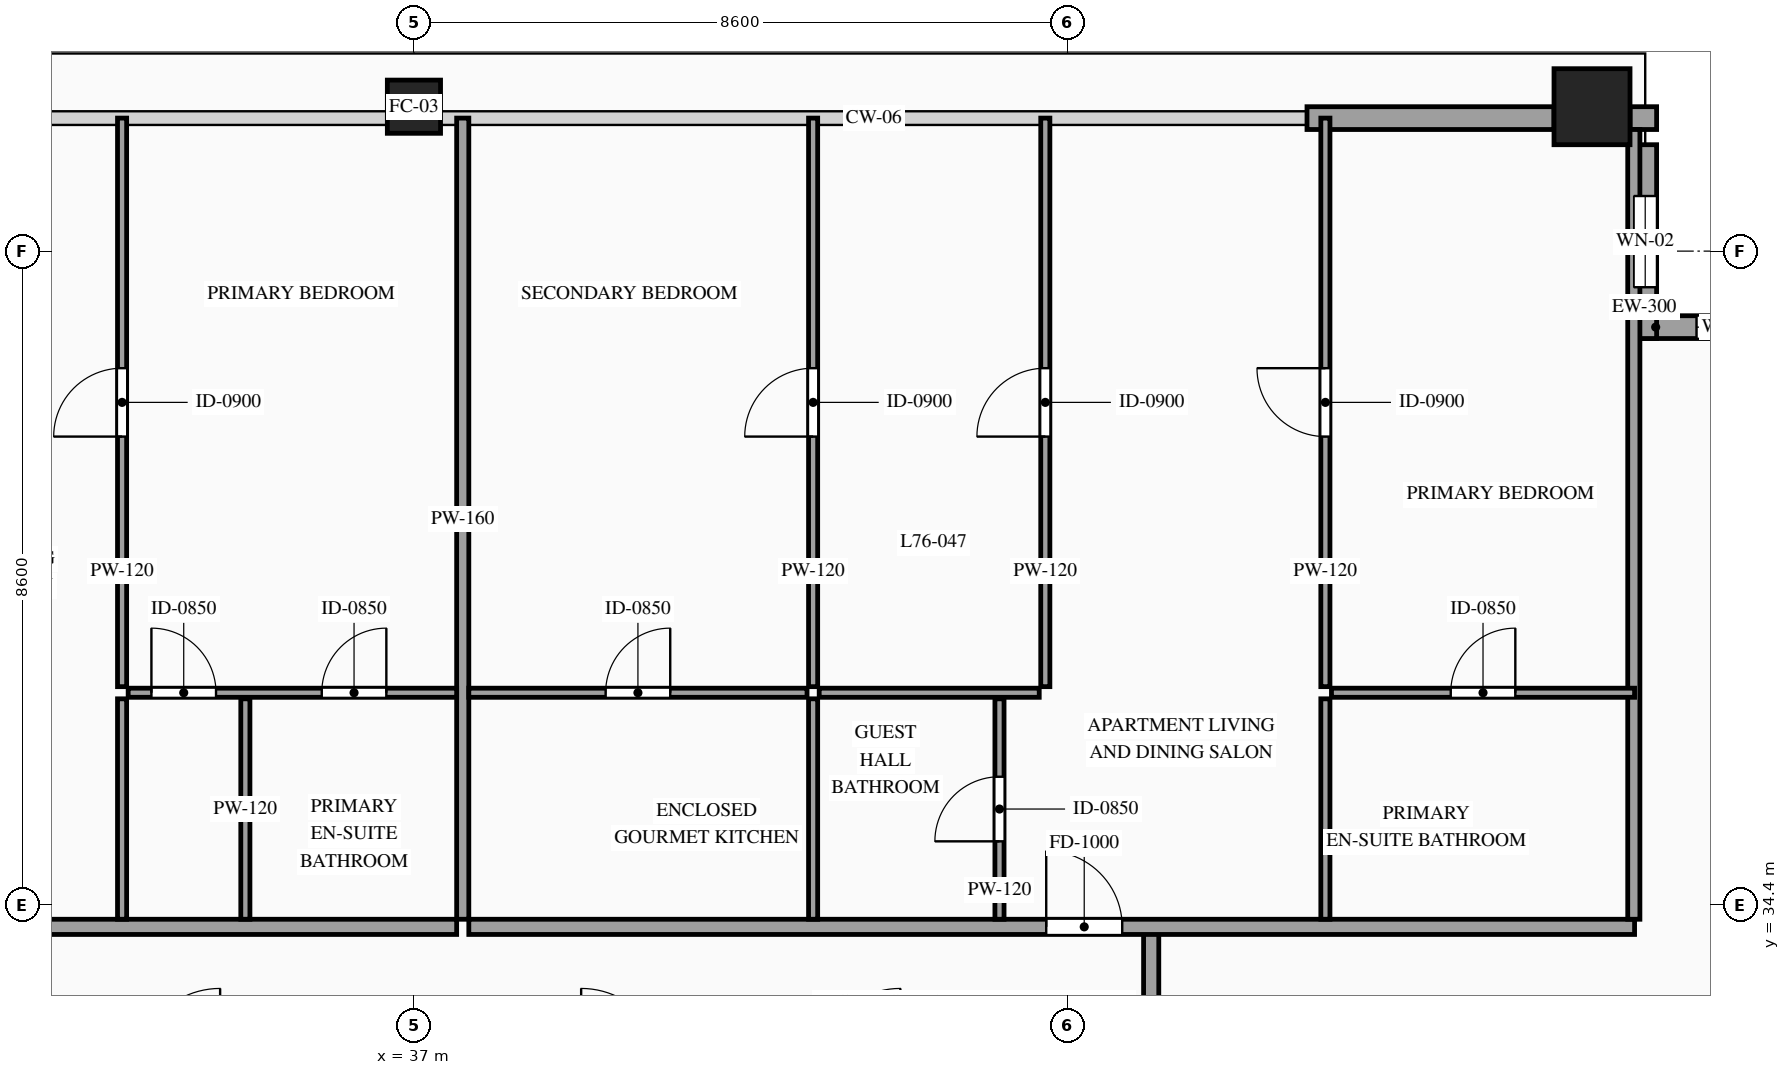
"""IFC4 building model, lengths in metres.
Left out: names, types, materials, properties, quantities, classifications, styles, units other than length and angle.
Written with IfcOpenShell. Run it as: python <this file> out.ifc"""

import sys

from ifc_helpers import new_model, si_unit, direction, frame, frame_2d, origin, origin_2d, place, context, subcontext, project, spatial, rectangle, hollow_rectangle, extrude, source, transform, mapped, element, fill, save


model = new_model("IFC4")
c1 = context("Model", 3, precision=1e-05, world=origin(), true_north=direction((0.0, 1.0)))
c2 = subcontext(c1, "Body", "Model", "MODEL_VIEW")
j1 = project(units=[si_unit("LENGTHUNIT", "METRE"), si_unit("PLANEANGLEUNIT", "RADIAN")], contexts=[c1])
p1 = place(None, origin())
s1 = spatial("IfcSite", under=j1, at=p1, CompositionType="ELEMENT")
p2 = place(p1, origin())
s2 = spatial("IfcBuilding", under=s1, at=p2, CompositionType="ELEMENT")
p3 = place(p2, frame((0.0, 0.0, 285.6)))
s3 = spatial("IfcBuildingStorey", under=s2, at=p3, CompositionType="ELEMENT", Elevation=285.6)
m1 = source(origin(), c2, "Body", "SweptSolid", [
    extrude(hollow_rectangle(XDim=0.7, YDim=0.7, WallThickness=0.032, at=origin_2d()), origin(), (0.0, 0.0, 1.0), 3.5),
])
p4 = place(p3, frame((37.0, 44.9, 0.0), z_axis=(0.0, 0.0, 1.0), x_axis=(1.0, 0.0, 0.0)))
e1 = element("IfcColumn", 1, at=p4, inside=s3, PredefinedType="COLUMN", context=c2, shape_type="MappedRepresentation", body=[
    mapped(m1, transform((0.0, 0.0, 0.0), scale=1.0)),
])
m2 = source(origin(), c2, "Body", "SweptSolid", [
    extrude(hollow_rectangle(XDim=1.0, YDim=1.0, WallThickness=0.048, at=origin_2d()), origin(), (0.0, 0.0, 1.0), 3.5),
])
p5 = place(p3, frame((52.5, 44.9, 0.0), z_axis=(0.0, 0.0, 1.0), x_axis=(1.0, 0.0, 0.0)))
e2 = element("IfcColumn", 2, at=p5, inside=s3, PredefinedType="COLUMN", context=c2, shape_type="MappedRepresentation", body=[
    mapped(m2, transform((0.0, 0.0, 0.0), scale=1.0)),
])
p6 = place(p3, frame((55.6, 42.0, 0.0), z_axis=(0.0, 0.0, 1.0), x_axis=(-1.0, 0.0, 0.0)))
e3 = element("IfcWall", 3, at=p6, inside=s3, PredefinedType="SOLIDWALL", context=c2, shape_type="SweptSolid", body=[
    extrude(rectangle(XDim=2.55, YDim=0.3, at=frame_2d((1.275, 0.0))), origin(), (0.0, 0.0, 1.0), 3.28),
])
p7 = place(p6, frame((0.825, 0.0, 0.85)))
e4 = element("IfcOpeningElement", 4, at=p7, cuts=e3, PredefinedType="OPENING", context=c2, shape_type="SweptSolid", body=[
    extrude(rectangle(XDim=0.9, YDim=1.5, at=frame_2d((0.45, 0.75))), frame((0.0, 0.165, 0.0), z_axis=(0.0, -1.0, 0.0), x_axis=(1.0, 0.0, 0.0)), (0.0, 0.0, 1.0), 0.33),
])
p8 = place(p3, frame((53.2, 41.85, 0.0), z_axis=(0.0, 0.0, 1.0), x_axis=(0.0, 1.0, 0.0)))
e5 = element("IfcWall", 5, at=p8, inside=s3, PredefinedType="SOLIDWALL", context=c2, shape_type="SweptSolid", body=[
    extrude(rectangle(XDim=2.55, YDim=0.3, at=frame_2d((1.275, 0.0))), origin(), (0.0, 0.0, 1.0), 3.28),
])
p9 = place(p8, frame((0.675, 0.0, 0.85)))
e6 = element("IfcOpeningElement", 6, at=p9, cuts=e5, PredefinedType="OPENING", context=c2, shape_type="SweptSolid", body=[
    extrude(rectangle(XDim=1.2, YDim=2.1, at=frame_2d((0.6, 1.05))), frame((0.0, 0.165, 0.0), z_axis=(0.0, -1.0, 0.0), x_axis=(1.0, 0.0, 0.0)), (0.0, 0.0, 1.0), 0.33),
])
m3 = source(origin(), c2, "Body", "SweptSolid", [
    extrude(rectangle(XDim=0.35, YDim=0.3, at=frame_2d((0.175, 0.0))), origin(), (0.0, 0.0, 1.0), 3.28),
])
p10 = place(p3, frame((53.0, 44.75, 0.0), z_axis=(0.0, 0.0, 1.0), x_axis=(1.0, 0.0, 0.0)))
e7 = element("IfcWall", 7, at=p10, inside=s3, PredefinedType="SOLIDWALL", context=c2, shape_type="MappedRepresentation", body=[
    mapped(m3, transform((0.0, 0.0, 0.0), scale=1.0)),
])
m4 = source(origin(), c2, "Body", "SweptSolid", [
    extrude(rectangle(XDim=3.25, YDim=0.3, at=frame_2d((1.625, 0.0))), origin(), (0.0, 0.0, 1.0), 2.885),
])
p11 = place(p3, frame((48.75, 44.75, 0.0), z_axis=(0.0, 0.0, 1.0), x_axis=(1.0, 0.0, 0.0)))
e8 = element("IfcWall", 8, at=p11, inside=s3, PredefinedType="SOLIDWALL", context=c2, shape_type="MappedRepresentation", body=[
    mapped(m4, transform((0.0, 0.0, 0.0), scale=1.0)),
])
m5 = source(origin(), c2, "Body", "SweptSolid", [
    extrude(rectangle(XDim=1.7, YDim=0.2, at=frame_2d((0.85, 0.0))), origin(), (0.0, 0.0, 1.0), 3.28),
])
p12 = place(p3, frame((46.7, 32.35, 0.0), z_axis=(0.0, 0.0, 1.0), x_axis=(0.0, 1.0, 0.0)))
e9 = element("IfcWall", 9, at=p12, inside=s3, PredefinedType="PARTITIONING", context=c2, shape_type="MappedRepresentation", body=[
    mapped(m5, transform((0.0, 0.0, 0.0), scale=1.0)),
])
p13 = place(p3, frame((20.94, 34.11, 0.0), z_axis=(0.0, 0.0, 1.0), x_axis=(1.0, 0.0, 0.0)))
e10 = element("IfcWall", 10, at=p13, inside=s3, PredefinedType="PARTITIONING", context=c2, shape_type="SweptSolid", body=[
    extrude(rectangle(XDim=16.622, YDim=0.2, at=frame_2d((8.311, 0.0))), origin(), (0.0, 0.0, 1.0), 3.28),
])
p14 = place(p13, frame((9.611, 0.0, 0.0)))
e11 = element("IfcOpeningElement", 11, at=p14, cuts=e10, PredefinedType="OPENING", context=c2, shape_type="SweptSolid", body=[
    extrude(rectangle(XDim=1.0, YDim=2.2, at=frame_2d((0.5, 1.1))), frame((0.0, 0.115, 0.0), z_axis=(0.0, -1.0, 0.0), x_axis=(1.0, 0.0, 0.0)), (0.0, 0.0, 1.0), 0.23),
])
m6 = source(origin(), c2, "Body", "SweptSolid", [
    extrude(rectangle(XDim=10.54, YDim=0.16, at=frame_2d((5.27, 0.0))), origin(), (0.0, 0.0, 1.0), 3.28),
])
p15 = place(p3, frame((37.642, 34.21, 0.0), z_axis=(0.0, 0.0, 1.0), x_axis=(0.0, 1.0, 0.0)))
e12 = element("IfcWall", 12, at=p15, inside=s3, PredefinedType="PARTITIONING", context=c2, shape_type="MappedRepresentation", body=[
    mapped(m6, transform((0.0, 0.0, 0.0), scale=1.0)),
])
m7 = source(origin(), c2, "Body", "SweptSolid", [
    extrude(rectangle(XDim=2.9, YDim=0.12, at=frame_2d((1.45, 0.0))), origin(), (0.0, 0.0, 1.0), 3.28),
])
for number, where, z_axis, x_axis in (
    (13, (34.782, 34.21, 0.0), (0.0, 0.0, 1.0), (0.0, 1.0, 0.0)),
    (14, (33.16, 34.21, 0.0), (0.0, 0.0, 1.0), (0.0, 1.0, 0.0)),
):
    element("IfcWall", number, at=place(p3, frame(where, z_axis=z_axis, x_axis=x_axis)), inside=s3, PredefinedType="PARTITIONING", context=c2, shape_type="MappedRepresentation", body=[
        mapped(m7, transform((0.0, 0.0, 0.0), scale=1.0)),
    ])
p16 = place(p3, frame((33.24, 37.19, 0.0), z_axis=(0.0, 0.0, 1.0), x_axis=(1.0, 0.0, 0.0)))
e15 = element("IfcWall", 15, at=p16, inside=s3, PredefinedType="PARTITIONING", context=c2, shape_type="SweptSolid", body=[
    extrude(rectangle(XDim=4.322, YDim=0.12, at=frame_2d((2.161, 0.0))), origin(), (0.0, 0.0, 1.0), 3.28),
])
p17 = place(p16, frame((2.547, 0.0, 0.0)))
e16 = element("IfcOpeningElement", 16, at=p17, cuts=e15, PredefinedType="OPENING", context=c2, shape_type="SweptSolid", body=[
    extrude(rectangle(XDim=0.85, YDim=2.1, at=frame_2d((0.425, 1.05))), frame((0.0, 0.075, 0.0), z_axis=(0.0, -1.0, 0.0), x_axis=(1.0, 0.0, 0.0)), (0.0, 0.0, 1.0), 0.15),
])
p18 = place(p16, frame((0.306, 0.0, 0.0)))
e17 = element("IfcOpeningElement", 17, at=p18, cuts=e15, PredefinedType="OPENING", context=c2, shape_type="SweptSolid", body=[
    extrude(rectangle(XDim=0.85, YDim=2.1, at=frame_2d((0.425, 1.05))), frame((0.0, 0.075, 0.0), z_axis=(0.0, -1.0, 0.0), x_axis=(1.0, 0.0, 0.0)), (0.0, 0.0, 1.0), 0.15),
])
p19 = place(p3, frame((33.16, 37.27, 0.0), z_axis=(0.0, 0.0, 1.0), x_axis=(0.0, 1.0, 0.0)))
e18 = element("IfcWall", 18, at=p19, inside=s3, PredefinedType="PARTITIONING", context=c2, shape_type="SweptSolid", body=[
    extrude(rectangle(XDim=7.48, YDim=0.12, at=frame_2d((3.74, 0.0))), origin(), (0.0, 0.0, 1.0), 3.28),
])
p20 = place(p19, frame((3.29, 0.0, 0.0)))
e19 = element("IfcOpeningElement", 19, at=p20, cuts=e18, PredefinedType="OPENING", context=c2, shape_type="SweptSolid", body=[
    extrude(rectangle(XDim=0.9, YDim=2.15, at=frame_2d((0.45, 1.075))), frame((0.0, 0.075, 0.0), z_axis=(0.0, -1.0, 0.0), x_axis=(1.0, 0.0, 0.0)), (0.0, 0.0, 1.0), 0.15),
])
p21 = place(p3, frame((37.722, 34.11, 0.0), z_axis=(0.0, 0.0, 1.0), x_axis=(1.0, 0.0, 0.0)))
e20 = element("IfcWall", 20, at=p21, inside=s3, PredefinedType="PARTITIONING", context=c2, shape_type="SweptSolid", body=[
    extrude(rectangle(XDim=15.338, YDim=0.2, at=frame_2d((7.669, 0.0))), origin(), (0.0, 0.0, 1.0), 3.28),
])
p22 = place(p21, frame((7.597, 0.0, 0.0)))
e21 = element("IfcOpeningElement", 21, at=p22, cuts=e20, PredefinedType="OPENING", context=c2, shape_type="SweptSolid", body=[
    extrude(rectangle(XDim=1.0, YDim=2.2, at=frame_2d((0.5, 1.1))), frame((0.0, 0.115, 0.0), z_axis=(0.0, -1.0, 0.0), x_axis=(1.0, 0.0, 0.0)), (0.0, 0.0, 1.0), 0.23),
])
m8 = source(origin(), c2, "Body", "SweptSolid", [
    extrude(rectangle(XDim=10.39, YDim=0.16, at=frame_2d((5.195, 0.0))), origin(), (0.0, 0.0, 1.0), 3.28),
])
p23 = place(p3, frame((53.05, 34.21, 0.0), z_axis=(0.0, 0.0, 1.0), x_axis=(0.0, 1.0, 0.0)))
e22 = element("IfcWall", 22, at=p23, inside=s3, PredefinedType="PARTITIONING", context=c2, shape_type="MappedRepresentation", body=[
    mapped(m8, transform((0.0, 0.0, 0.0), scale=1.0)),
])
p24 = place(p3, frame((37.722, 37.19, 0.0), z_axis=(0.0, 0.0, 1.0), x_axis=(1.0, 0.0, 0.0)))
e23 = element("IfcWall", 23, at=p24, inside=s3, PredefinedType="PARTITIONING", context=c2, shape_type="SweptSolid", body=[
    extrude(rectangle(XDim=4.45, YDim=0.12, at=frame_2d((2.225, 0.0))), origin(), (0.0, 0.0, 1.0), 3.28),
])
p25 = place(p24, frame((1.8, 0.0, 0.0)))
e24 = element("IfcOpeningElement", 24, at=p25, cuts=e23, PredefinedType="OPENING", context=c2, shape_type="SweptSolid", body=[
    extrude(rectangle(XDim=0.85, YDim=2.1, at=frame_2d((0.425, 1.05))), frame((0.0, 0.075, 0.0), z_axis=(0.0, -1.0, 0.0), x_axis=(1.0, 0.0, 0.0)), (0.0, 0.0, 1.0), 0.15),
])
p26 = place(p3, frame((42.252, 34.21, 0.0), z_axis=(0.0, 0.0, 1.0), x_axis=(0.0, 1.0, 0.0)))
e25 = element("IfcWall", 25, at=p26, inside=s3, PredefinedType="PARTITIONING", context=c2, shape_type="MappedRepresentation", body=[
    mapped(m7, transform((0.0, 0.0, 0.0), scale=1.0)),
])
p27 = place(p3, frame((44.704, 34.21, 0.0), z_axis=(0.0, 0.0, 1.0), x_axis=(0.0, 1.0, 0.0)))
e26 = element("IfcWall", 26, at=p27, inside=s3, PredefinedType="PARTITIONING", context=c2, shape_type="SweptSolid", body=[
    extrude(rectangle(XDim=2.9, YDim=0.12, at=frame_2d((1.45, 0.0))), origin(), (0.0, 0.0, 1.0), 3.28),
])
p28 = place(p27, frame((1.025, 0.0, 0.0)))
e27 = element("IfcOpeningElement", 27, at=p28, cuts=e26, PredefinedType="OPENING", context=c2, shape_type="SweptSolid", body=[
    extrude(rectangle(XDim=0.85, YDim=2.1, at=frame_2d((0.425, 1.05))), frame((0.0, 0.075, 0.0), z_axis=(0.0, -1.0, 0.0), x_axis=(1.0, 0.0, 0.0)), (0.0, 0.0, 1.0), 0.15),
])
p29 = place(p3, frame((49.072, 37.19, 0.0), z_axis=(0.0, 0.0, 1.0), x_axis=(1.0, 0.0, 0.0)))
e28 = element("IfcWall", 28, at=p29, inside=s3, PredefinedType="PARTITIONING", context=c2, shape_type="SweptSolid", body=[
    extrude(rectangle(XDim=3.988, YDim=0.12, at=frame_2d((1.994, 0.0))), origin(), (0.0, 0.0, 1.0), 3.28),
])
p30 = place(p29, frame((1.569, 0.0, 0.0)))
e29 = element("IfcOpeningElement", 29, at=p30, cuts=e28, PredefinedType="OPENING", context=c2, shape_type="SweptSolid", body=[
    extrude(rectangle(XDim=0.85, YDim=2.1, at=frame_2d((0.425, 1.05))), frame((0.0, 0.075, 0.0), z_axis=(0.0, -1.0, 0.0), x_axis=(1.0, 0.0, 0.0)), (0.0, 0.0, 1.0), 0.15),
])
p31 = place(p3, frame((48.992, 34.21, 0.0), z_axis=(0.0, 0.0, 1.0), x_axis=(0.0, 1.0, 0.0)))
e30 = element("IfcWall", 30, at=p31, inside=s3, PredefinedType="PARTITIONING", context=c2, shape_type="MappedRepresentation", body=[
    mapped(m7, transform((0.0, 0.0, 0.0), scale=1.0)),
])
p32 = place(p3, frame((42.252, 37.27, 0.0), z_axis=(0.0, 0.0, 1.0), x_axis=(0.0, 1.0, 0.0)))
e31 = element("IfcWall", 31, at=p32, inside=s3, PredefinedType="PARTITIONING", context=c2, shape_type="SweptSolid", body=[
    extrude(rectangle(XDim=7.48, YDim=0.12, at=frame_2d((3.74, 0.0))), origin(), (0.0, 0.0, 1.0), 3.28),
])
p33 = place(p32, frame((3.29, 0.0, 0.0)))
e32 = element("IfcOpeningElement", 32, at=p33, cuts=e31, PredefinedType="OPENING", context=c2, shape_type="SweptSolid", body=[
    extrude(rectangle(XDim=0.9, YDim=2.15, at=frame_2d((0.45, 1.075))), frame((0.0, 0.075, 0.0), z_axis=(0.0, -1.0, 0.0), x_axis=(1.0, 0.0, 0.0)), (0.0, 0.0, 1.0), 0.15),
])
p34 = place(p3, frame((48.992, 37.27, 0.0), z_axis=(0.0, 0.0, 1.0), x_axis=(0.0, 1.0, 0.0)))
e33 = element("IfcWall", 33, at=p34, inside=s3, PredefinedType="PARTITIONING", context=c2, shape_type="SweptSolid", body=[
    extrude(rectangle(XDim=7.48, YDim=0.12, at=frame_2d((3.74, 0.0))), origin(), (0.0, 0.0, 1.0), 3.28),
])
p35 = place(p34, frame((3.29, 0.0, 0.0)))
e34 = element("IfcOpeningElement", 34, at=p35, cuts=e33, PredefinedType="OPENING", context=c2, shape_type="SweptSolid", body=[
    extrude(rectangle(XDim=0.9, YDim=2.15, at=frame_2d((0.45, 1.075))), frame((0.0, 0.075, 0.0), z_axis=(0.0, -1.0, 0.0), x_axis=(1.0, 0.0, 0.0)), (0.0, 0.0, 1.0), 0.15),
])
m9 = source(origin(), c2, "Body", "SweptSolid", [
    extrude(rectangle(XDim=2.895, YDim=0.12, at=frame_2d((1.448, 0.0))), origin(), (0.0, 0.0, 1.0), 3.28),
])
p36 = place(p3, frame((42.332, 37.19, 0.0), z_axis=(0.0, 0.0, 1.0), x_axis=(1.0, 0.0, 0.0)))
e35 = element("IfcWall", 35, at=p36, inside=s3, PredefinedType="PARTITIONING", context=c2, shape_type="MappedRepresentation", body=[
    mapped(m9, transform((0.0, 0.0, 0.0), scale=1.0)),
])
p37 = place(p3, frame((45.307, 37.27, 0.0), z_axis=(0.0, 0.0, 1.0), x_axis=(0.0, 1.0, 0.0)))
e36 = element("IfcWall", 36, at=p37, inside=s3, PredefinedType="PARTITIONING", context=c2, shape_type="SweptSolid", body=[
    extrude(rectangle(XDim=7.48, YDim=0.12, at=frame_2d((3.74, 0.0))), origin(), (0.0, 0.0, 1.0), 3.28),
])
p38 = place(p37, frame((3.29, 0.0, 0.0)))
e37 = element("IfcOpeningElement", 37, at=p38, cuts=e36, PredefinedType="OPENING", context=c2, shape_type="SweptSolid", body=[
    extrude(rectangle(XDim=0.9, YDim=2.15, at=frame_2d((0.45, 1.075))), frame((0.0, 0.075, 0.0), z_axis=(0.0, -1.0, 0.0), x_axis=(1.0, 0.0, 0.0)), (0.0, 0.0, 1.0), 0.15),
])
m10 = source(origin(), c2, "Body", "SweptSolid", [
    extrude(rectangle(XDim=0.9, YDim=1.5, at=frame_2d((0.45, 0.75))), frame((0.0, 0.03, 0.0), z_axis=(0.0, -1.0, 0.0), x_axis=(1.0, 0.0, 0.0)), (0.0, 0.0, 1.0), 0.06),
])
p39 = place(p7, origin())
e38 = element("IfcWindow", 38, at=p39, inside=s3, PartitioningType="SINGLE_PANEL", PredefinedType="WINDOW", context=c2, shape_type="MappedRepresentation", body=[
    mapped(m10, transform((0.0, 0.0, 0.0), scale=1.0)),
])
fill(e4, e38)
m11 = source(origin(), c2, "Body", "SweptSolid", [
    extrude(rectangle(XDim=1.2, YDim=2.1, at=frame_2d((0.6, 1.05))), frame((0.0, 0.03, 0.0), z_axis=(0.0, -1.0, 0.0), x_axis=(1.0, 0.0, 0.0)), (0.0, 0.0, 1.0), 0.06),
])
p40 = place(p9, origin())
e39 = element("IfcWindow", 39, at=p40, inside=s3, PartitioningType="SINGLE_PANEL", PredefinedType="WINDOW", context=c2, shape_type="MappedRepresentation", body=[
    mapped(m11, transform((0.0, 0.0, 0.0), scale=1.0)),
])
fill(e6, e39)
m12 = source(origin(), c2, "Body", "SweptSolid", [
    extrude(rectangle(XDim=0.85, YDim=2.1, at=frame_2d((0.425, 1.05))), frame((0.0, 0.025, 0.0), z_axis=(0.0, -1.0, 0.0), x_axis=(1.0, 0.0, 0.0)), (0.0, 0.0, 1.0), 0.05),
])
p41 = place(p17, origin())
e40 = element("IfcDoor", 40, at=p41, inside=s3, OperationType="SINGLE_SWING_RIGHT", PredefinedType="DOOR", context=c2, shape_type="MappedRepresentation", body=[
    mapped(m12, transform((0.0, 0.0, 0.0), scale=1.0)),
])
fill(e16, e40)
p42 = place(p18, origin())
e41 = element("IfcDoor", 41, at=p42, inside=s3, OperationType="SINGLE_SWING_LEFT", PredefinedType="DOOR", context=c2, shape_type="MappedRepresentation", body=[
    mapped(m12, transform((0.0, 0.0, 0.0), scale=1.0)),
])
fill(e17, e41)
m13 = source(origin(), c2, "Body", "SweptSolid", [
    extrude(rectangle(XDim=0.9, YDim=2.15, at=frame_2d((0.45, 1.075))), frame((0.0, 0.025, 0.0), z_axis=(0.0, -1.0, 0.0), x_axis=(1.0, 0.0, 0.0)), (0.0, 0.0, 1.0), 0.05),
])
p43 = place(p20, origin())
e42 = element("IfcDoor", 42, at=p43, inside=s3, OperationType="SINGLE_SWING_LEFT", PredefinedType="DOOR", context=c2, shape_type="MappedRepresentation", body=[
    mapped(m13, transform((0.0, 0.0, 0.0), scale=1.0)),
])
fill(e19, e42)
m14 = source(origin(), c2, "Body", "SweptSolid", [
    extrude(rectangle(XDim=1.0, YDim=2.2, at=frame_2d((0.5, 1.1))), frame((0.0, 0.025, 0.0), z_axis=(0.0, -1.0, 0.0), x_axis=(1.0, 0.0, 0.0)), (0.0, 0.0, 1.0), 0.05),
])
p44 = place(p22, origin())
e43 = element("IfcDoor", 43, at=p44, inside=s3, OperationType="SINGLE_SWING_LEFT", PredefinedType="DOOR", context=c2, shape_type="MappedRepresentation", body=[
    mapped(m14, transform((0.0, 0.0, 0.0), scale=1.0)),
])
fill(e21, e43)
p45 = place(p25, origin())
e44 = element("IfcDoor", 44, at=p45, inside=s3, OperationType="SINGLE_SWING_RIGHT", PredefinedType="DOOR", context=c2, shape_type="MappedRepresentation", body=[
    mapped(m12, transform((0.0, 0.0, 0.0), scale=1.0)),
])
fill(e24, e44)
p46 = place(p28, origin())
e45 = element("IfcDoor", 45, at=p46, inside=s3, OperationType="SINGLE_SWING_LEFT", PredefinedType="DOOR", context=c2, shape_type="MappedRepresentation", body=[
    mapped(m12, transform((0.0, 0.0, 0.0), scale=1.0)),
])
fill(e27, e45)
p47 = place(p30, origin())
e46 = element("IfcDoor", 46, at=p47, inside=s3, OperationType="SINGLE_SWING_RIGHT", PredefinedType="DOOR", context=c2, shape_type="MappedRepresentation", body=[
    mapped(m12, transform((0.0, 0.0, 0.0), scale=1.0)),
])
fill(e29, e46)
p48 = place(p33, origin())
e47 = element("IfcDoor", 47, at=p48, inside=s3, OperationType="SINGLE_SWING_LEFT", PredefinedType="DOOR", context=c2, shape_type="MappedRepresentation", body=[
    mapped(m13, transform((0.0, 0.0, 0.0), scale=1.0)),
])
fill(e32, e47)
p49 = place(p35, origin())
e48 = element("IfcDoor", 48, at=p49, inside=s3, OperationType="SINGLE_SWING_RIGHT", PredefinedType="DOOR", context=c2, shape_type="MappedRepresentation", body=[
    mapped(m13, transform((0.0, 0.0, 0.0), scale=1.0)),
])
fill(e34, e48)
p50 = place(p38, origin())
e49 = element("IfcDoor", 49, at=p50, inside=s3, OperationType="SINGLE_SWING_LEFT", PredefinedType="DOOR", context=c2, shape_type="MappedRepresentation", body=[
    mapped(m13, transform((0.0, 0.0, 0.0), scale=1.0)),
])
fill(e37, e49)
save(model, sys.argv[1])
